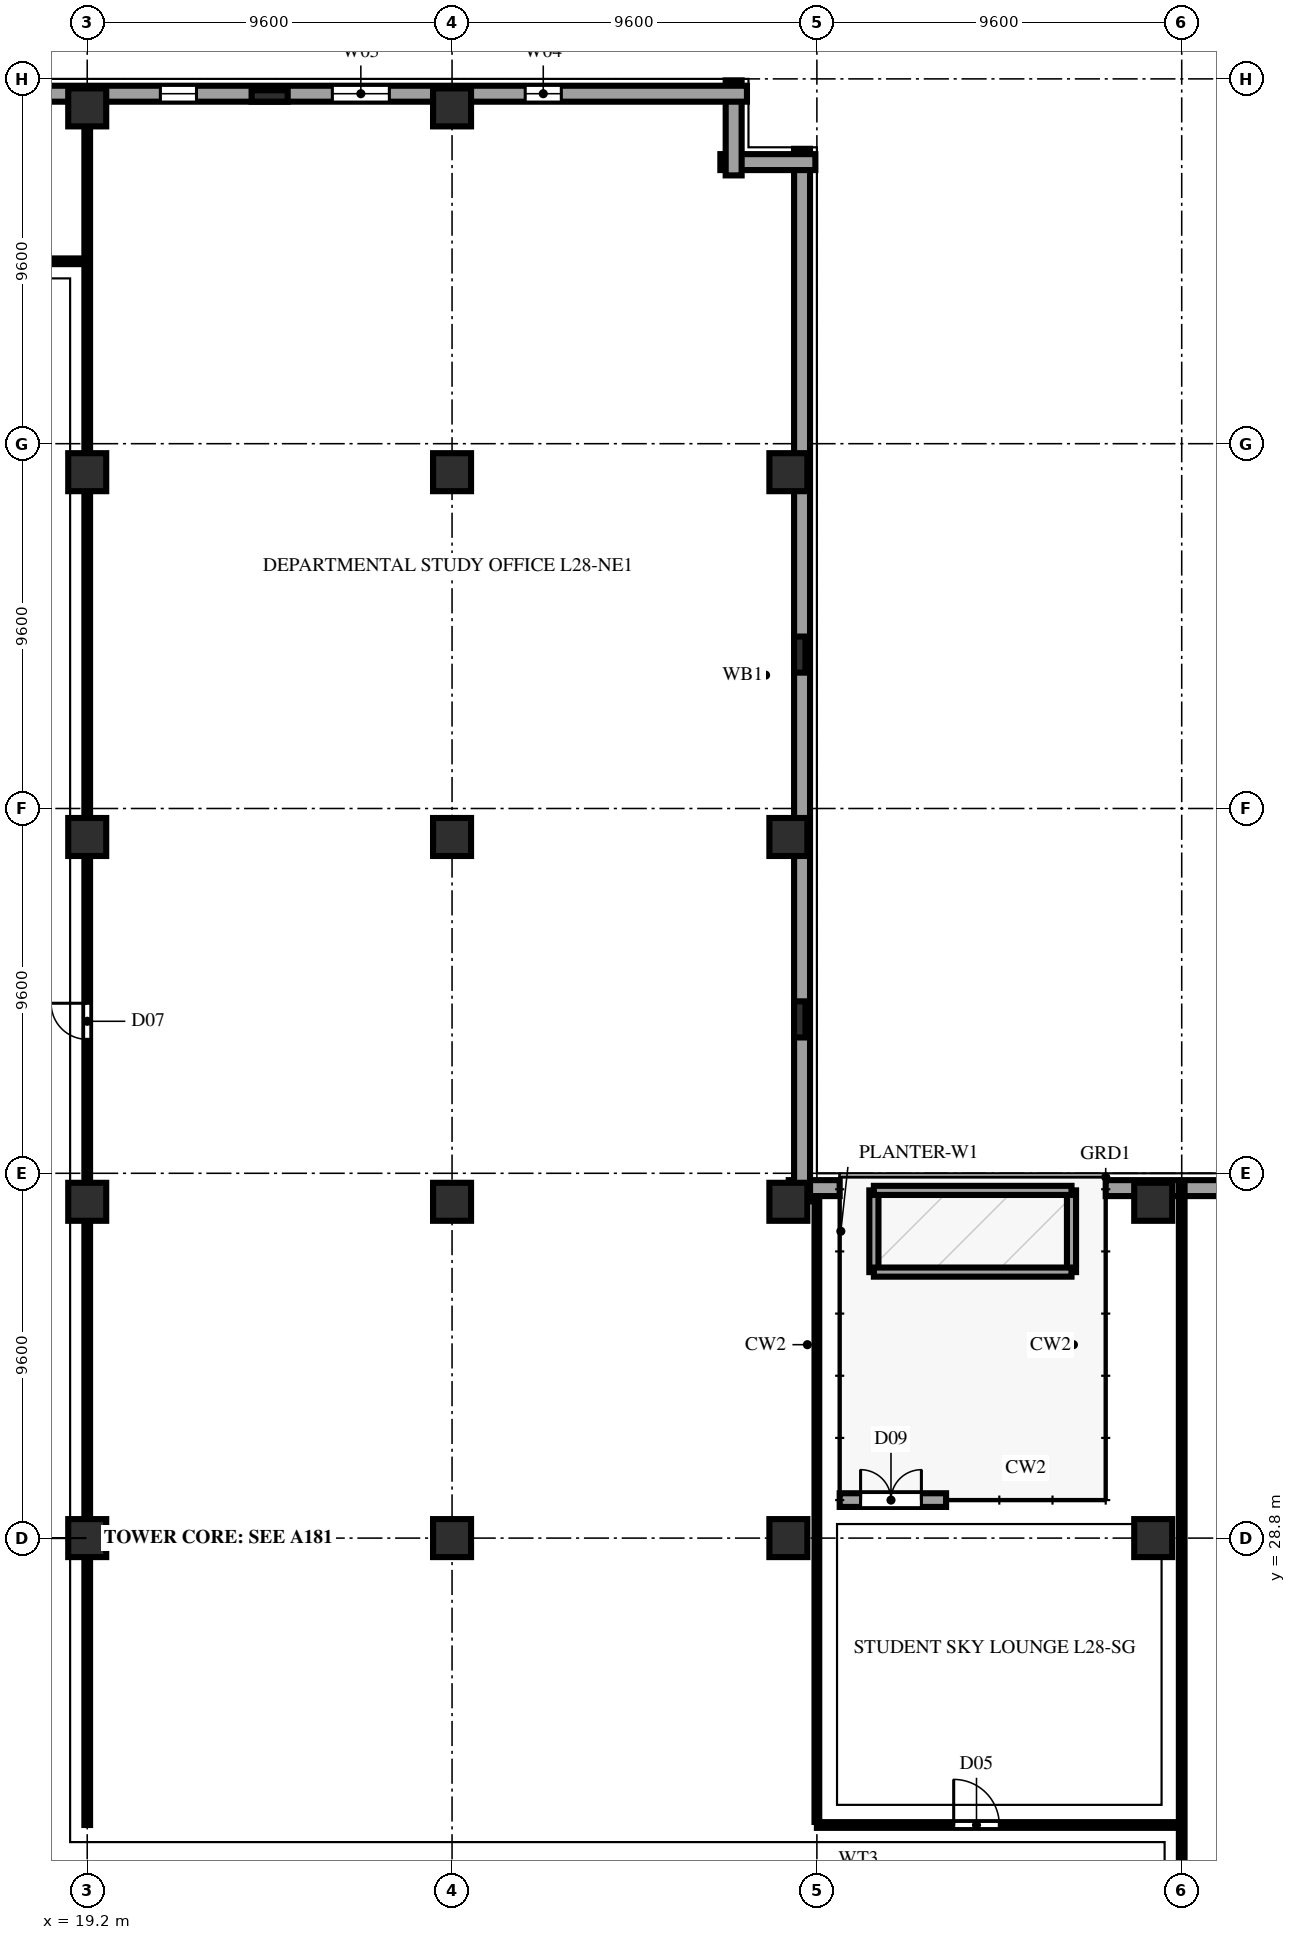
"""IFC4 building model, lengths in metres.
Left out: names, types, materials, properties, quantities, classifications, styles, units other than length and angle.
Written with IfcOpenShell. Run it as: python <this file> out.ifc"""

import sys

from ifc_helpers import new_model, si_unit, direction, frame, frame_2d, origin, origin_2d, place, context, subcontext, project, spatial, rectangle, extrude, element, fill, save


model = new_model("IFC4")
c1 = context("Model", 3, precision=1e-05, world=origin(), true_north=direction((0.0, 1.0)))
c2 = subcontext(c1, "Body", "Model", "MODEL_VIEW")
j1 = project(units=[si_unit("LENGTHUNIT", "METRE"), si_unit("PLANEANGLEUNIT", "RADIAN")], contexts=[c1])
p1 = place(None, origin())
s1 = spatial("IfcSite", under=j1, at=p1, CompositionType="ELEMENT")
p2 = place(p1, origin())
s2 = spatial("IfcBuilding", under=s1, at=p2, CompositionType="ELEMENT")
p3 = place(p2, frame((0.0, 0.0, 112.8)))
s3 = spatial("IfcBuildingStorey", under=s2, at=p3, CompositionType="ELEMENT", Elevation=112.8)
for number, where, z_axis, x_axis in (
    (1, (19.2, 28.8, 0.0), (0.0, 0.0, 1.0), (1.0, 0.0, 0.0)),
    (2, (19.2, 37.65, 0.0), (0.0, 0.0, 1.0), (1.0, 0.0, 0.0)),
    (3, (19.2, 47.25, 0.0), (0.0, 0.0, 1.0), (1.0, 0.0, 0.0)),
    (4, (19.2, 56.85, 0.0), (0.0, 0.0, 1.0), (1.0, 0.0, 0.0)),
    (5, (19.2, 66.45, 0.0), (0.0, 0.0, 1.0), (1.0, 0.0, 0.0)),
    (6, (28.8, 28.8, 0.0), (0.0, 0.0, 1.0), (1.0, 0.0, 0.0)),
    (7, (28.8, 37.65, 0.0), (0.0, 0.0, 1.0), (1.0, 0.0, 0.0)),
    (8, (28.8, 47.25, 0.0), (0.0, 0.0, 1.0), (1.0, 0.0, 0.0)),
    (9, (28.8, 56.85, 0.0), (0.0, 0.0, 1.0), (1.0, 0.0, 0.0)),
    (10, (28.8, 66.45, 0.0), (0.0, 0.0, 1.0), (1.0, 0.0, 0.0)),
    (11, (37.65, 28.8, 0.0), (0.0, 0.0, 1.0), (1.0, 0.0, 0.0)),
    (12, (37.65, 37.65, 0.0), (0.0, 0.0, 1.0), (1.0, 0.0, 0.0)),
    (13, (37.65, 47.25, 0.0), (0.0, 0.0, 1.0), (1.0, 0.0, 0.0)),
    (14, (37.65, 56.85, 0.0), (0.0, 0.0, 1.0), (1.0, 0.0, 0.0)),
    (15, (47.25, 28.8, 0.0), (0.0, 0.0, 1.0), (1.0, 0.0, 0.0)),
    (16, (47.25, 37.65, 0.0), (0.0, 0.0, 1.0), (1.0, 0.0, 0.0)),
):
    element("IfcColumn", number, at=place(p3, frame(where, z_axis=z_axis, x_axis=x_axis)), inside=s3, PredefinedType="COLUMN", context=c2, shape_type="SweptSolid", body=[
        extrude(rectangle(XDim=1.0, YDim=1.0, at=origin_2d()), origin(), (0.0, 0.0, 1.0), 3.8),
    ])
for number, where, z_axis, x_axis in (
    (17, (24.0, 66.75, 0.0), (0.0, 0.0, 1.0), (1.0, 0.0, 0.0)),
    (18, (37.95, 42.45, 0.0), (0.0, 0.0, 1.0), (0.0, 1.0, 0.0)),
    (19, (37.95, 52.05, 0.0), (0.0, 0.0, 1.0), (0.0, 1.0, 0.0)),
):
    element("IfcColumn", number, at=place(p3, frame(where, z_axis=z_axis, x_axis=x_axis)), inside=s3, PredefinedType="PILASTER", context=c2, shape_type="SweptSolid", body=[
        extrude(rectangle(XDim=0.95, YDim=0.3, at=origin_2d()), origin(), (0.0, 0.0, 1.0), 3.8),
    ])
p4 = place(p3, frame((55.76, 38.01, 0.0), z_axis=(0.0, 0.0, 1.0), x_axis=(-1.0, 0.0, 0.0)))
e20 = element("IfcWall", 20, at=p4, inside=s3, PredefinedType="SOLIDWALL", context=c2, shape_type="SweptSolid", body=[
    extrude(rectangle(XDim=9.76, YDim=0.42, at=frame_2d((4.88, 0.0))), origin(), (0.0, 0.0, 1.0), 3.54),
])
p5 = place(p3, frame((39.0, 38.01, 0.0), z_axis=(0.0, 0.0, 1.0), x_axis=(-1.0, 0.0, 0.0)))
e21 = element("IfcWall", 21, at=p5, inside=s3, PredefinedType="SOLIDWALL", context=c2, shape_type="SweptSolid", body=[
    extrude(rectangle(XDim=1.34, YDim=0.42, at=frame_2d((0.67, 0.0))), origin(), (0.0, 0.0, 1.0), 3.54),
])
p6 = place(p3, frame((38.01, 37.66, 0.0), z_axis=(0.0, 0.0, 1.0), x_axis=(0.0, 1.0, 0.0)))
e22 = element("IfcWall", 22, at=p6, inside=s3, PredefinedType="SOLIDWALL", context=c2, shape_type="SweptSolid", body=[
    extrude(rectangle(XDim=27.7, YDim=0.42, at=frame_2d((13.85, 0.0))), origin(), (0.0, 0.0, 1.0), 3.54),
])
for number, where, z_axis, x_axis in (
    (23, (38.36, 65.01, 0.0), (0.0, 0.0, 1.0), (-1.0, 0.0, 0.0)),
    (24, (36.21, 64.66, 0.0), (0.0, 0.0, 1.0), (0.0, 1.0, 0.0)),
):
    element("IfcWall", number, at=place(p3, frame(where, z_axis=z_axis, x_axis=x_axis)), inside=s3, PredefinedType="SOLIDWALL", context=c2, shape_type="SweptSolid", body=[
        extrude(rectangle(XDim=2.5, YDim=0.42, at=frame_2d((1.25, 0.0))), origin(), (0.0, 0.0, 1.0), 3.54),
    ])
p7 = place(p3, frame((36.56, 66.81, 0.0), z_axis=(0.0, 0.0, 1.0), x_axis=(-1.0, 0.0, 0.0)))
e25 = element("IfcWall", 25, at=p7, inside=s3, PredefinedType="SOLIDWALL", context=c2, shape_type="SweptSolid", body=[
    extrude(rectangle(XDim=34.72, YDim=0.42, at=frame_2d((17.36, 0.0))), origin(), (0.0, 0.0, 1.0), 3.54),
])
p8 = place(p7, frame((4.885, 0.0, 0.9)))
e26 = element("IfcOpeningElement", 26, at=p8, cuts=e25, PredefinedType="OPENING", context=c2, shape_type="SweptSolid", body=[
    extrude(rectangle(XDim=0.95, YDim=1.85, at=frame_2d((0.475, 0.925))), frame((0.0, 0.222, 0.0), z_axis=(0.0, -1.0, 0.0), x_axis=(1.0, 0.0, 0.0)), (0.0, 0.0, 1.0), 0.444),
])
p9 = place(p7, frame((9.41, 0.0, 0.9)))
e27 = element("IfcOpeningElement", 27, at=p9, cuts=e25, PredefinedType="OPENING", context=c2, shape_type="SweptSolid", body=[
    extrude(rectangle(XDim=1.5, YDim=1.85, at=frame_2d((0.75, 0.925))), frame((0.0, 0.222, 0.0), z_axis=(0.0, -1.0, 0.0), x_axis=(1.0, 0.0, 0.0)), (0.0, 0.0, 1.0), 0.444),
])
p10 = place(p7, frame((14.485, 0.0, 0.9)))
e28 = element("IfcOpeningElement", 28, at=p10, cuts=e25, PredefinedType="OPENING", context=c2, shape_type="SweptSolid", body=[
    extrude(rectangle(XDim=0.95, YDim=1.85, at=frame_2d((0.475, 0.925))), frame((0.0, 0.222, 0.0), z_axis=(0.0, -1.0, 0.0), x_axis=(1.0, 0.0, 0.0)), (0.0, 0.0, 1.0), 0.444),
])
p11 = place(p3, frame((39.0, 29.8, 0.0), z_axis=(0.0, 0.0, 1.0), x_axis=(1.0, 0.0, 0.0)))
e29 = element("IfcWall", 29, at=p11, inside=s3, PredefinedType="SOLIDWALL", context=c2, shape_type="SweptSolid", body=[
    extrude(rectangle(XDim=2.8, YDim=0.36, at=frame_2d((1.4, 0.0))), origin(), (0.0, 0.0, 1.0), 3.54),
])
p12 = place(p11, frame((0.55, 0.0, 0.0)))
e30 = element("IfcOpeningElement", 30, at=p12, cuts=e29, PredefinedType="OPENING", context=c2, shape_type="SweptSolid", body=[
    extrude(rectangle(XDim=1.6, YDim=2.3, at=frame_2d((0.8, 1.15))), frame((0.0, 0.192, 0.0), z_axis=(0.0, -1.0, 0.0), x_axis=(1.0, 0.0, 0.0)), (0.0, 0.0, 1.0), 0.384),
])
for number, where, z_axis, x_axis in (
    (31, (39.9, 35.8, 0.0), (0.0, 0.0, 1.0), (0.0, 1.0, 0.0)),
    (32, (45.1, 35.8, 0.0), (0.0, 0.0, 1.0), (0.0, 1.0, 0.0)),
):
    element("IfcWall", number, at=place(p3, frame(where, z_axis=z_axis, x_axis=x_axis)), inside=s3, PredefinedType="USERDEFINED", context=c2, shape_type="SweptSolid", body=[
        extrude(rectangle(XDim=2.15, YDim=0.24, at=frame_2d((1.075, 0.0))), origin(), (0.0, 0.0, 1.0), 0.62),
    ])
for number, where, z_axis, x_axis in (
    (33, (39.9, 35.8, 0.0), (0.0, 0.0, 1.0), (1.0, 0.0, 0.0)),
    (34, (39.9, 37.95, 0.0), (0.0, 0.0, 1.0), (1.0, 0.0, 0.0)),
):
    element("IfcWall", number, at=place(p3, frame(where, z_axis=z_axis, x_axis=x_axis)), inside=s3, PredefinedType="USERDEFINED", context=c2, shape_type="SweptSolid", body=[
        extrude(rectangle(XDim=5.2, YDim=0.24, at=frame_2d((2.6, 0.0))), origin(), (0.0, 0.0, 1.0), 0.62),
    ])
p13 = place(p3, frame((17.05, 62.4, 0.0), z_axis=(0.0, 0.0, 1.0), x_axis=(1.0, 0.0, 0.0)))
e35 = element("IfcWall", 35, at=p13, inside=s3, PredefinedType="PARTITIONING", context=c2, shape_type="SweptSolid", body=[
    extrude(rectangle(XDim=2.15, YDim=0.15, at=frame_2d((1.075, 0.0))), origin(), (0.0, 0.0, 1.0), 3.54),
])
p14 = place(p3, frame((48.0, 0.22, 0.0), z_axis=(0.0, 0.0, 1.0), x_axis=(0.0, 1.0, 0.0)))
e36 = element("IfcWall", 36, at=p14, inside=s3, PredefinedType="PARTITIONING", context=c2, shape_type="SweptSolid", body=[
    extrude(rectangle(XDim=37.96, YDim=0.15, at=frame_2d((18.98, 0.0))), origin(), (0.0, 0.0, 1.0), 3.54),
])
p15 = place(p14, frame((13.73, 0.0, 0.0)))
e37 = element("IfcOpeningElement", 37, at=p15, cuts=e36, PredefinedType="OPENING", context=c2, shape_type="SweptSolid", body=[
    extrude(rectangle(XDim=0.95, YDim=2.15, at=frame_2d((0.475, 1.075))), frame((0.0, 0.087, 0.0), z_axis=(0.0, -1.0, 0.0), x_axis=(1.0, 0.0, 0.0)), (0.0, 0.0, 1.0), 0.174),
])
p16 = place(p3, frame((38.4, 21.25, 0.0), z_axis=(0.0, 0.0, 1.0), x_axis=(1.0, 0.0, 0.0)))
e38 = element("IfcWall", 38, at=p16, inside=s3, PredefinedType="PARTITIONING", context=c2, shape_type="SweptSolid", body=[
    extrude(rectangle(XDim=9.52, YDim=0.15, at=frame_2d((4.76, 0.0))), origin(), (0.0, 0.0, 1.0), 3.54),
])
p17 = place(p16, frame((3.6, 0.0, 0.0)))
e39 = element("IfcOpeningElement", 39, at=p17, cuts=e38, PredefinedType="OPENING", context=c2, shape_type="SweptSolid", body=[
    extrude(rectangle(XDim=1.2, YDim=2.2, at=frame_2d((0.6, 1.1))), frame((0.0, 0.087, 0.0), z_axis=(0.0, -1.0, 0.0), x_axis=(1.0, 0.0, 0.0)), (0.0, 0.0, 1.0), 0.174),
])
p18 = place(p3, frame((38.4, 21.33, 0.0), z_axis=(0.0, 0.0, 1.0), x_axis=(0.0, 1.0, 0.0)))
e40 = element("IfcWall", 40, at=p18, inside=s3, PredefinedType="PARTITIONING", context=c2, shape_type="SweptSolid", body=[
    extrude(rectangle(XDim=16.46, YDim=0.125, at=frame_2d((8.23, 0.0))), origin(), (0.0, 0.0, 1.0), 3.54),
])
p19 = place(p3, frame((19.2, 21.25, 0.0), z_axis=(0.0, 0.0, 1.0), x_axis=(0.0, 1.0, 0.0)))
e41 = element("IfcWall", 41, at=p19, inside=s3, PredefinedType="PARTITIONING", context=c2, shape_type="SweptSolid", body=[
    extrude(rectangle(XDim=45.2, YDim=0.15, at=frame_2d((22.6, 0.0))), origin(), (0.0, 0.0, 1.0), 2.845),
])
p20 = place(p19, frame((20.675, 0.0, 0.0)))
e42 = element("IfcOpeningElement", 42, at=p20, cuts=e41, PredefinedType="OPENING", context=c2, shape_type="SweptSolid", body=[
    extrude(rectangle(XDim=0.95, YDim=2.15, at=frame_2d((0.475, 1.075))), frame((0.0, 0.087, 0.0), z_axis=(0.0, -1.0, 0.0), x_axis=(1.0, 0.0, 0.0)), (0.0, 0.0, 1.0), 0.174),
])
p21 = place(p3, frame((19.2, 66.45, 0.0), z_axis=(0.0, 0.0, 1.0), x_axis=(0.0, 1.0, 0.0)))
e43 = element("IfcWall", 43, at=p21, inside=s3, PredefinedType="PARTITIONING", context=c2, shape_type="SweptSolid", body=[
    extrude(rectangle(XDim=0.53, YDim=0.15, at=frame_2d((0.265, 0.0))), origin(), (0.0, 0.0, 1.0), 3.54),
])
p22 = place(p8, origin())
e44 = element("IfcWindow", 44, at=p22, inside=s3, PartitioningType="SINGLE_PANEL", PredefinedType="WINDOW", context=c2, shape_type="SweptSolid", body=[
    extrude(rectangle(XDim=0.95, YDim=1.85, at=frame_2d((0.475, 0.925))), frame((0.0, 0.11, 0.0), z_axis=(0.0, -1.0, 0.0), x_axis=(1.0, 0.0, 0.0)), (0.0, 0.0, 1.0), 0.06),
])
fill(e26, e44)
p23 = place(p9, origin())
e45 = element("IfcWindow", 45, at=p23, inside=s3, PartitioningType="DOUBLE_PANEL_VERTICAL", PredefinedType="WINDOW", context=c2, shape_type="SweptSolid", body=[
    extrude(rectangle(XDim=1.5, YDim=1.85, at=frame_2d((0.75, 0.925))), frame((0.0, 0.11, 0.0), z_axis=(0.0, -1.0, 0.0), x_axis=(1.0, 0.0, 0.0)), (0.0, 0.0, 1.0), 0.06),
])
fill(e27, e45)
p24 = place(p10, origin())
e46 = element("IfcWindow", 46, at=p24, inside=s3, PartitioningType="SINGLE_PANEL", PredefinedType="WINDOW", context=c2, shape_type="SweptSolid", body=[
    extrude(rectangle(XDim=0.95, YDim=1.85, at=frame_2d((0.475, 0.925))), frame((0.0, 0.11, 0.0), z_axis=(0.0, -1.0, 0.0), x_axis=(1.0, 0.0, 0.0)), (0.0, 0.0, 1.0), 0.06),
])
fill(e28, e46)
p25 = place(p12, origin())
e47 = element("IfcDoor", 47, at=p25, inside=s3, OperationType="DOUBLE_SWING_LEFT", PredefinedType="DOOR", context=c2, shape_type="SweptSolid", body=[
    extrude(rectangle(XDim=1.6, YDim=2.3, at=frame_2d((0.8, 1.15))), frame((0.0, 0.025, 0.0), z_axis=(0.0, -1.0, 0.0), x_axis=(1.0, 0.0, 0.0)), (0.0, 0.0, 1.0), 0.05),
])
fill(e30, e47)
p26 = place(p17, origin())
e48 = element("IfcDoor", 48, at=p26, inside=s3, OperationType="SINGLE_SWING_LEFT", PredefinedType="DOOR", context=c2, shape_type="SweptSolid", body=[
    extrude(rectangle(XDim=1.2, YDim=2.2, at=frame_2d((0.6, 1.1))), frame((0.0, 0.025, 0.0), z_axis=(0.0, -1.0, 0.0), x_axis=(1.0, 0.0, 0.0)), (0.0, 0.0, 1.0), 0.05),
])
fill(e39, e48)
p27 = place(p20, origin())
e49 = element("IfcDoor", 49, at=p27, inside=s3, OperationType="SINGLE_SWING_RIGHT", PredefinedType="DOOR", context=c2, shape_type="SweptSolid", body=[
    extrude(rectangle(XDim=0.95, YDim=2.15, at=frame_2d((0.475, 1.075))), frame((0.0, 0.025, 0.0), z_axis=(0.0, -1.0, 0.0), x_axis=(1.0, 0.0, 0.0)), (0.0, 0.0, 1.0), 0.05),
])
fill(e42, e49)
save(model, sys.argv[1])
